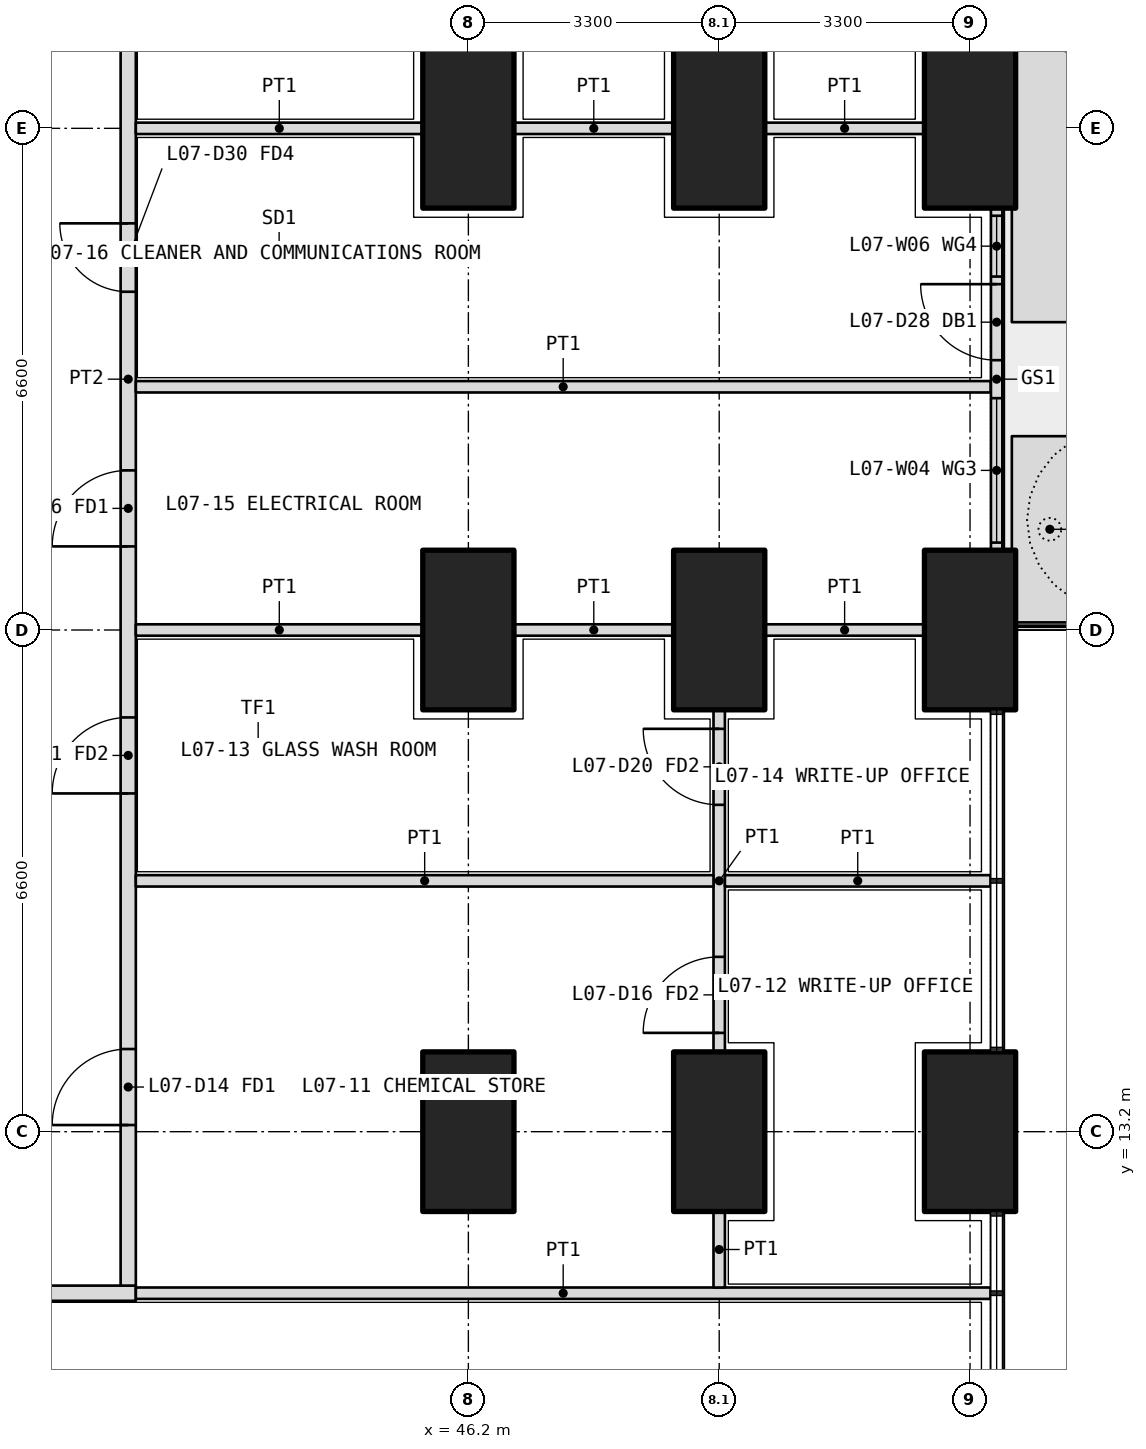
"""IFC4 building model, lengths in metres.
Left out: names, types, materials, properties, quantities, classifications, styles, units other than length and angle.
Written with IfcOpenShell. Run it as: python <this file> out.ifc"""

import sys

from ifc_helpers import new_model, si_unit, direction, frame, frame_2d, origin, origin_2d, place, context, subcontext, project, spatial, polyline, rectangle, outline, extrude, element, fill, save


model = new_model("IFC4")
c1 = context("Model", 3, precision=1e-05, world=origin(), true_north=direction((0.0, 1.0)))
c2 = subcontext(c1, "Body", "Model", "MODEL_VIEW")
j1 = project(units=[si_unit("LENGTHUNIT", "METRE"), si_unit("PLANEANGLEUNIT", "RADIAN")], contexts=[c1])
p1 = place(None, origin())
s1 = spatial("IfcSite", under=j1, at=p1, CompositionType="ELEMENT")
p2 = place(p1, origin())
s2 = spatial("IfcBuilding", under=s1, at=p2, CompositionType="ELEMENT")
p3 = place(p2, frame((0.0, 0.0, 33.9)))
s3 = spatial("IfcBuildingStorey", under=s2, at=p3, CompositionType="ELEMENT", Elevation=33.9)
for number, where, z_axis, x_axis in (
    (1, (52.8, 13.2, 0.0), (0.0, 0.0, 1.0), (0.0, 1.0, 0.0)),
    (2, (52.8, 19.8, 0.0), (0.0, 0.0, 1.0), (0.0, 1.0, 0.0)),
    (3, (52.8, 26.4, 0.0), (0.0, 0.0, 1.0), (0.0, 1.0, 0.0)),
    (4, (49.5, 13.2, 0.0), (0.0, 0.0, 1.0), (0.0, 1.0, 0.0)),
    (5, (49.5, 19.8, 0.0), (0.0, 0.0, 1.0), (0.0, 1.0, 0.0)),
    (6, (49.5, 26.4, 0.0), (0.0, 0.0, 1.0), (0.0, 1.0, 0.0)),
    (7, (46.2, 13.2, 0.0), (0.0, 0.0, 1.0), (0.0, 1.0, 0.0)),
    (8, (46.2, 19.8, 0.0), (0.0, 0.0, 1.0), (0.0, 1.0, 0.0)),
    (9, (46.2, 26.4, 0.0), (0.0, 0.0, 1.0), (0.0, 1.0, 0.0)),
):
    element("IfcColumn", number, at=place(p3, frame(where, z_axis=z_axis, x_axis=x_axis)), inside=s3, PredefinedType="COLUMN", context=c2, shape_type="SweptSolid", body=[
        extrude(rectangle(XDim=2.1, YDim=1.2, at=origin_2d()), origin(), (0.0, 0.0, 1.0), 4.2),
    ])
p4 = place(p3, origin())
e10 = element("IfcWall", 10, at=p4, inside=s3, PredefinedType="USERDEFINED", context=c2, shape_type="SweptSolid", body=[
    extrude(outline(polyline([(53.35, 19.9), (54.35, 19.9), (54.35, 22.35), (53.35, 22.35), (53.35, 19.9)]), holes=[polyline([(53.5, 20.05), (54.2, 20.05), (54.2, 22.2), (53.5, 22.2), (53.5, 20.05)])]), origin(), (0.0, 0.0, 1.0), 1.05),
])
p5 = place(p3, origin())
e11 = element("IfcWall", 11, at=p5, inside=s3, PredefinedType="USERDEFINED", context=c2, shape_type="SweptSolid", body=[
    extrude(outline(polyline([(53.35, 23.85), (54.35, 23.85), (54.35, 32.9), (53.35, 32.9), (53.35, 23.85)]), holes=[polyline([(53.5, 24.0), (54.2, 24.0), (54.2, 32.75), (53.5, 32.75), (53.5, 24.0)])]), origin(), (0.0, 0.0, 1.0), 1.05),
])
p6 = place(p3, frame((53.15, 20.85, 0.0), z_axis=(0.0, 0.0, 1.0), x_axis=(0.0, 1.0, 0.0)))
e12 = element("IfcWall", 12, at=p6, inside=s3, PredefinedType="SOLIDWALL", context=c2, shape_type="SweptSolid", body=[
    extrude(rectangle(XDim=4.5, YDim=0.15, at=frame_2d((2.25, 0.0))), origin(), (0.0, 0.0, 1.0), 2.7),
])
p7 = place(p6, frame((2.5, 0.0, 0.0)))
e13 = element("IfcOpeningElement", 13, at=p7, cuts=e12, PredefinedType="OPENING", context=c2, shape_type="SweptSolid", body=[
    extrude(rectangle(XDim=1.0, YDim=2.4, at=frame_2d((0.5, 1.2))), frame((0.0, 0.085, 0.0), z_axis=(0.0, -1.0, 0.0), x_axis=(1.0, 0.0, 0.0)), (0.0, 0.0, 1.0), 0.17),
])
p8 = place(p6, frame((0.1, 0.0, 0.1)))
e14 = element("IfcOpeningElement", 14, at=p8, cuts=e12, PredefinedType="OPENING", context=c2, shape_type="SweptSolid", body=[
    extrude(rectangle(XDim=1.9, YDim=2.3, at=frame_2d((0.95, 1.15))), frame((0.0, 0.085, 0.0), z_axis=(0.0, -1.0, 0.0), x_axis=(1.0, 0.0, 0.0)), (0.0, 0.0, 1.0), 0.17),
])
p9 = place(p6, frame((3.6, 0.0, 0.1)))
e15 = element("IfcOpeningElement", 15, at=p9, cuts=e12, PredefinedType="OPENING", context=c2, shape_type="SweptSolid", body=[
    extrude(rectangle(XDim=0.8, YDim=2.3, at=frame_2d((0.4, 1.15))), frame((0.0, 0.085, 0.0), z_axis=(0.0, -1.0, 0.0), x_axis=(1.0, 0.0, 0.0)), (0.0, 0.0, 1.0), 0.17),
])
p10 = place(p3, frame((10.975, 11.075, 0.0), z_axis=(0.0, 0.0, 1.0), x_axis=(1.0, 0.0, 0.0)))
e16 = element("IfcWall", 16, at=p10, inside=s3, PredefinedType="PARTITIONING", context=c2, shape_type="SweptSolid", body=[
    extrude(rectangle(XDim=30.85, YDim=0.2, at=frame_2d((15.425, 0.0))), origin(), (0.0, 0.0, 1.0), 2.85),
])
p11 = place(p10, frame((2.312, 0.0, 0.0)))
e17 = element("IfcOpeningElement", 17, at=p11, cuts=e16, PredefinedType="OPENING", context=c2, shape_type="SweptSolid", body=[
    extrude(rectangle(XDim=1.0, YDim=2.1, at=frame_2d((0.5, 1.05))), frame((0.0, 0.11, 0.0), z_axis=(0.0, -1.0, 0.0), x_axis=(1.0, 0.0, 0.0)), (0.0, 0.0, 1.0), 0.22),
])
p12 = place(p10, frame((8.325, 0.0, 0.0)))
e18 = element("IfcOpeningElement", 18, at=p12, cuts=e16, PredefinedType="OPENING", context=c2, shape_type="SweptSolid", body=[
    extrude(rectangle(XDim=1.0, YDim=2.1, at=frame_2d((0.5, 1.05))), frame((0.0, 0.11, 0.0), z_axis=(0.0, -1.0, 0.0), x_axis=(1.0, 0.0, 0.0)), (0.0, 0.0, 1.0), 0.22),
])
p13 = place(p10, frame((13.175, 0.0, 0.0)))
e19 = element("IfcOpeningElement", 19, at=p13, cuts=e16, PredefinedType="OPENING", context=c2, shape_type="SweptSolid", body=[
    extrude(rectangle(XDim=1.2, YDim=2.1, at=frame_2d((0.6, 1.05))), frame((0.0, 0.11, 0.0), z_axis=(0.0, -1.0, 0.0), x_axis=(1.0, 0.0, 0.0)), (0.0, 0.0, 1.0), 0.22),
])
p14 = place(p10, frame((19.875, 0.0, 0.0)))
e20 = element("IfcOpeningElement", 20, at=p14, cuts=e16, PredefinedType="OPENING", context=c2, shape_type="SweptSolid", body=[
    extrude(rectangle(XDim=1.0, YDim=2.1, at=frame_2d((0.5, 1.05))), frame((0.0, 0.11, 0.0), z_axis=(0.0, -1.0, 0.0), x_axis=(1.0, 0.0, 0.0)), (0.0, 0.0, 1.0), 0.22),
])
p15 = place(p10, frame((27.538, 0.0, 0.0)))
e21 = element("IfcOpeningElement", 21, at=p15, cuts=e16, PredefinedType="OPENING", context=c2, shape_type="SweptSolid", body=[
    extrude(rectangle(XDim=1.0, YDim=2.1, at=frame_2d((0.5, 1.05))), frame((0.0, 0.11, 0.0), z_axis=(0.0, -1.0, 0.0), x_axis=(1.0, 0.0, 0.0)), (0.0, 0.0, 1.0), 0.22),
])
p16 = place(p3, frame((41.725, 11.175, 0.0), z_axis=(0.0, 0.0, 1.0), x_axis=(0.0, 1.0, 0.0)))
e22 = element("IfcWall", 22, at=p16, inside=s3, PredefinedType="PARTITIONING", context=c2, shape_type="SweptSolid", body=[
    extrude(rectangle(XDim=23.85, YDim=0.2, at=frame_2d((11.925, 0.0))), origin(), (0.0, 0.0, 1.0), 2.85),
])
p17 = place(p16, frame((2.113, 0.0, 0.0)))
e23 = element("IfcOpeningElement", 23, at=p17, cuts=e22, PredefinedType="OPENING", context=c2, shape_type="SweptSolid", body=[
    extrude(rectangle(XDim=1.0, YDim=2.1, at=frame_2d((0.5, 1.05))), frame((0.0, 0.11, 0.0), z_axis=(0.0, -1.0, 0.0), x_axis=(1.0, 0.0, 0.0)), (0.0, 0.0, 1.0), 0.22),
])
p18 = place(p16, frame((6.475, 0.0, 0.0)))
e24 = element("IfcOpeningElement", 24, at=p18, cuts=e22, PredefinedType="OPENING", context=c2, shape_type="SweptSolid", body=[
    extrude(rectangle(XDim=1.0, YDim=2.1, at=frame_2d((0.5, 1.05))), frame((0.0, 0.11, 0.0), z_axis=(0.0, -1.0, 0.0), x_axis=(1.0, 0.0, 0.0)), (0.0, 0.0, 1.0), 0.22),
])
p19 = place(p16, frame((9.725, 0.0, 0.0)))
e25 = element("IfcOpeningElement", 25, at=p19, cuts=e22, PredefinedType="OPENING", context=c2, shape_type="SweptSolid", body=[
    extrude(rectangle(XDim=1.0, YDim=2.1, at=frame_2d((0.5, 1.05))), frame((0.0, 0.11, 0.0), z_axis=(0.0, -1.0, 0.0), x_axis=(1.0, 0.0, 0.0)), (0.0, 0.0, 1.0), 0.22),
])
p20 = place(p16, frame((13.075, 0.0, 0.0)))
e26 = element("IfcOpeningElement", 26, at=p20, cuts=e22, PredefinedType="OPENING", context=c2, shape_type="SweptSolid", body=[
    extrude(rectangle(XDim=0.9, YDim=2.1, at=frame_2d((0.45, 1.05))), frame((0.0, 0.11, 0.0), z_axis=(0.0, -1.0, 0.0), x_axis=(1.0, 0.0, 0.0)), (0.0, 0.0, 1.0), 0.22),
])
p21 = place(p16, frame((19.087, 0.0, 0.0)))
e27 = element("IfcOpeningElement", 27, at=p21, cuts=e22, PredefinedType="OPENING", context=c2, shape_type="SweptSolid", body=[
    extrude(rectangle(XDim=1.0, YDim=2.1, at=frame_2d((0.5, 1.05))), frame((0.0, 0.11, 0.0), z_axis=(0.0, -1.0, 0.0), x_axis=(1.0, 0.0, 0.0)), (0.0, 0.0, 1.0), 0.22),
])
p22 = place(p3, frame((53.07, 11.075, 0.0), z_axis=(0.0, 0.0, 1.0), x_axis=(-1.0, 0.0, 0.0)))
e28 = element("IfcWall", 28, at=p22, inside=s3, PredefinedType="PARTITIONING", context=c2, shape_type="SweptSolid", body=[
    extrude(rectangle(XDim=11.245, YDim=0.15, at=frame_2d((5.623, 0.0))), origin(), (0.0, 0.0, 1.0), 2.7),
])
p23 = place(p3, frame((49.5, 11.15, 0.0), z_axis=(0.0, 0.0, 1.0), x_axis=(0.0, 1.0, 0.0)))
e29 = element("IfcWall", 29, at=p23, inside=s3, PredefinedType="PARTITIONING", context=c2, shape_type="SweptSolid", body=[
    extrude(rectangle(XDim=1.0, YDim=0.15, at=frame_2d((0.5, 0.0))), origin(), (0.0, 0.0, 1.0), 3.9),
])
p24 = place(p3, frame((49.5, 14.25, 0.0), z_axis=(0.0, 0.0, 1.0), x_axis=(0.0, 1.0, 0.0)))
e30 = element("IfcWall", 30, at=p24, inside=s3, PredefinedType="PARTITIONING", context=c2, shape_type="SweptSolid", body=[
    extrude(rectangle(XDim=4.5, YDim=0.15, at=frame_2d((2.25, 0.0))), origin(), (0.0, 0.0, 1.0), 3.9),
])
p25 = place(p24, frame((0.25, 0.0, 0.0)))
e31 = element("IfcOpeningElement", 31, at=p25, cuts=e30, PredefinedType="OPENING", context=c2, shape_type="SweptSolid", body=[
    extrude(rectangle(XDim=1.0, YDim=2.1, at=frame_2d((0.5, 1.05))), frame((0.0, 0.085, 0.0), z_axis=(0.0, -1.0, 0.0), x_axis=(1.0, 0.0, 0.0)), (0.0, 0.0, 1.0), 0.17),
])
p26 = place(p24, frame((3.25, 0.0, 0.0)))
e32 = element("IfcOpeningElement", 32, at=p26, cuts=e30, PredefinedType="OPENING", context=c2, shape_type="SweptSolid", body=[
    extrude(rectangle(XDim=1.0, YDim=2.1, at=frame_2d((0.5, 1.05))), frame((0.0, 0.085, 0.0), z_axis=(0.0, -1.0, 0.0), x_axis=(1.0, 0.0, 0.0)), (0.0, 0.0, 1.0), 0.17),
])
p27 = place(p3, frame((53.07, 23.0, 0.0), z_axis=(0.0, 0.0, 1.0), x_axis=(-1.0, 0.0, 0.0)))
e33 = element("IfcWall", 33, at=p27, inside=s3, PredefinedType="PARTITIONING", context=c2, shape_type="SweptSolid", body=[
    extrude(rectangle(XDim=11.245, YDim=0.15, at=frame_2d((5.623, 0.0))), origin(), (0.0, 0.0, 1.0), 2.7),
])
for number, where, z_axis, x_axis in (
    (34, (52.2, 26.4, 0.0), (0.0, 0.0, 1.0), (-1.0, 0.0, 0.0)),
    (35, (48.9, 26.4, 0.0), (0.0, 0.0, 1.0), (-1.0, 0.0, 0.0)),
):
    element("IfcWall", number, at=place(p3, frame(where, z_axis=z_axis, x_axis=x_axis)), inside=s3, PredefinedType="PARTITIONING", context=c2, shape_type="SweptSolid", body=[
        extrude(rectangle(XDim=2.1, YDim=0.15, at=frame_2d((1.05, 0.0))), origin(), (0.0, 0.0, 1.0), 2.85),
    ])
p28 = place(p3, frame((45.6, 26.4, 0.0), z_axis=(0.0, 0.0, 1.0), x_axis=(-1.0, 0.0, 0.0)))
e36 = element("IfcWall", 36, at=p28, inside=s3, PredefinedType="PARTITIONING", context=c2, shape_type="SweptSolid", body=[
    extrude(rectangle(XDim=3.775, YDim=0.15, at=frame_2d((1.888, 0.0))), origin(), (0.0, 0.0, 1.0), 2.85),
])
p29 = place(p3, frame((53.07, 16.5, 0.0), z_axis=(0.0, 0.0, 1.0), x_axis=(-1.0, 0.0, 0.0)))
e37 = element("IfcWall", 37, at=p29, inside=s3, PredefinedType="PARTITIONING", context=c2, shape_type="SweptSolid", body=[
    extrude(rectangle(XDim=3.495, YDim=0.15, at=frame_2d((1.748, 0.0))), origin(), (0.0, 0.0, 1.0), 2.7),
])
p30 = place(p3, frame((49.425, 16.5, 0.0), z_axis=(0.0, 0.0, 1.0), x_axis=(-1.0, 0.0, 0.0)))
e38 = element("IfcWall", 38, at=p30, inside=s3, PredefinedType="PARTITIONING", context=c2, shape_type="SweptSolid", body=[
    extrude(rectangle(XDim=7.6, YDim=0.15, at=frame_2d((3.8, 0.0))), origin(), (0.0, 0.0, 1.0), 3.9),
])
for number, where, z_axis, x_axis in (
    (39, (52.2, 19.8, 0.0), (0.0, 0.0, 1.0), (-1.0, 0.0, 0.0)),
    (40, (48.9, 19.8, 0.0), (0.0, 0.0, 1.0), (-1.0, 0.0, 0.0)),
):
    element("IfcWall", number, at=place(p3, frame(where, z_axis=z_axis, x_axis=x_axis)), inside=s3, PredefinedType="PARTITIONING", context=c2, shape_type="SweptSolid", body=[
        extrude(rectangle(XDim=2.1, YDim=0.15, at=frame_2d((1.05, 0.0))), origin(), (0.0, 0.0, 1.0), 2.85),
    ])
p31 = place(p3, frame((45.6, 19.8, 0.0), z_axis=(0.0, 0.0, 1.0), x_axis=(-1.0, 0.0, 0.0)))
e41 = element("IfcWall", 41, at=p31, inside=s3, PredefinedType="PARTITIONING", context=c2, shape_type="SweptSolid", body=[
    extrude(rectangle(XDim=3.775, YDim=0.15, at=frame_2d((1.888, 0.0))), origin(), (0.0, 0.0, 1.0), 2.85),
])
p32 = place(p7, origin())
e42 = element("IfcDoor", 42, at=p32, inside=s3, OperationType="SINGLE_SWING_RIGHT", PredefinedType="DOOR", context=c2, shape_type="SweptSolid", body=[
    extrude(rectangle(XDim=1.0, YDim=2.4, at=frame_2d((0.5, 1.2))), frame((0.0, 0.025, 0.0), z_axis=(0.0, -1.0, 0.0), x_axis=(1.0, 0.0, 0.0)), (0.0, 0.0, 1.0), 0.05),
])
fill(e13, e42)
p33 = place(p8, origin())
e43 = element("IfcWindow", 43, at=p33, inside=s3, PartitioningType="SINGLE_PANEL", PredefinedType="WINDOW", context=c2, shape_type="SweptSolid", body=[
    extrude(rectangle(XDim=1.9, YDim=2.3, at=frame_2d((0.95, 1.15))), frame((0.0, 0.03, 0.0), z_axis=(0.0, -1.0, 0.0), x_axis=(1.0, 0.0, 0.0)), (0.0, 0.0, 1.0), 0.06),
])
fill(e14, e43)
p34 = place(p9, origin())
e44 = element("IfcWindow", 44, at=p34, inside=s3, PartitioningType="SINGLE_PANEL", PredefinedType="WINDOW", context=c2, shape_type="SweptSolid", body=[
    extrude(rectangle(XDim=0.8, YDim=2.3, at=frame_2d((0.4, 1.15))), frame((0.0, 0.03, 0.0), z_axis=(0.0, -1.0, 0.0), x_axis=(1.0, 0.0, 0.0)), (0.0, 0.0, 1.0), 0.06),
])
fill(e15, e44)
p35 = place(p17, origin())
e45 = element("IfcDoor", 45, at=p35, inside=s3, OperationType="SINGLE_SWING_LEFT", PredefinedType="DOOR", context=c2, shape_type="SweptSolid", body=[
    extrude(rectangle(XDim=1.0, YDim=2.1, at=frame_2d((0.5, 1.05))), frame((0.0, 0.025, 0.0), z_axis=(0.0, -1.0, 0.0), x_axis=(1.0, 0.0, 0.0)), (0.0, 0.0, 1.0), 0.05),
])
fill(e23, e45)
p36 = place(p25, origin())
e46 = element("IfcDoor", 46, at=p36, inside=s3, OperationType="SINGLE_SWING_LEFT", PredefinedType="DOOR", context=c2, shape_type="SweptSolid", body=[
    extrude(rectangle(XDim=1.0, YDim=2.1, at=frame_2d((0.5, 1.05))), frame((0.0, 0.025, 0.0), z_axis=(0.0, -1.0, 0.0), x_axis=(1.0, 0.0, 0.0)), (0.0, 0.0, 1.0), 0.05),
])
fill(e31, e46)
p37 = place(p18, origin())
e47 = element("IfcDoor", 47, at=p37, inside=s3, OperationType="SINGLE_SWING_LEFT", PredefinedType="DOOR", context=c2, shape_type="SweptSolid", body=[
    extrude(rectangle(XDim=1.0, YDim=2.1, at=frame_2d((0.5, 1.05))), frame((0.0, 0.025, 0.0), z_axis=(0.0, -1.0, 0.0), x_axis=(1.0, 0.0, 0.0)), (0.0, 0.0, 1.0), 0.05),
])
fill(e24, e47)
p38 = place(p26, origin())
e48 = element("IfcDoor", 48, at=p38, inside=s3, OperationType="SINGLE_SWING_RIGHT", PredefinedType="DOOR", context=c2, shape_type="SweptSolid", body=[
    extrude(rectangle(XDim=1.0, YDim=2.1, at=frame_2d((0.5, 1.05))), frame((0.0, 0.025, 0.0), z_axis=(0.0, -1.0, 0.0), x_axis=(1.0, 0.0, 0.0)), (0.0, 0.0, 1.0), 0.05),
])
fill(e32, e48)
p39 = place(p19, origin())
e49 = element("IfcDoor", 49, at=p39, inside=s3, OperationType="SINGLE_SWING_LEFT", PredefinedType="DOOR", context=c2, shape_type="SweptSolid", body=[
    extrude(rectangle(XDim=1.0, YDim=2.1, at=frame_2d((0.5, 1.05))), frame((0.0, 0.025, 0.0), z_axis=(0.0, -1.0, 0.0), x_axis=(1.0, 0.0, 0.0)), (0.0, 0.0, 1.0), 0.05),
])
fill(e25, e49)
p40 = place(p20, origin())
e50 = element("IfcDoor", 50, at=p40, inside=s3, OperationType="SINGLE_SWING_RIGHT", PredefinedType="DOOR", context=c2, shape_type="SweptSolid", body=[
    extrude(rectangle(XDim=0.9, YDim=2.1, at=frame_2d((0.45, 1.05))), frame((0.0, 0.025, 0.0), z_axis=(0.0, -1.0, 0.0), x_axis=(1.0, 0.0, 0.0)), (0.0, 0.0, 1.0), 0.05),
])
fill(e26, e50)
save(model, sys.argv[1])
